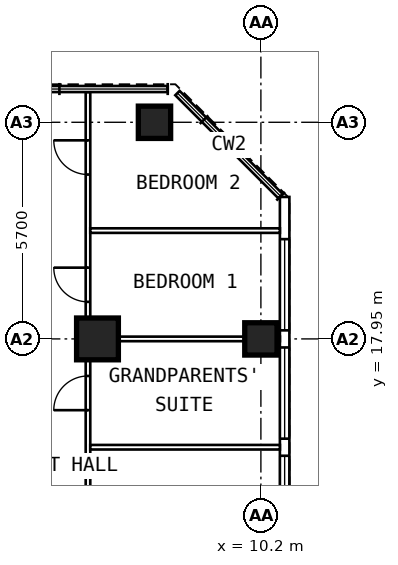
"""IFC4 building model, lengths in metres.
Left out: names, types, materials, properties, quantities, classifications, styles, units other than length and angle.
Written with IfcOpenShell. Run it as: python <this file> out.ifc"""

import sys

from ifc_helpers import new_model, si_unit, direction, frame, frame_2d, origin, origin_2d, place, context, subcontext, project, spatial, rectangle, extrude, element, fill, save


model = new_model("IFC4")
c1 = context("Model", 3, precision=1e-05, world=origin(), true_north=direction((0.0, 1.0)))
c2 = subcontext(c1, "Body", "Model", "MODEL_VIEW")
j1 = project(units=[si_unit("LENGTHUNIT", "METRE"), si_unit("PLANEANGLEUNIT", "RADIAN")], contexts=[c1])
p1 = place(None, origin())
s1 = spatial("IfcSite", under=j1, at=p1, CompositionType="ELEMENT")
p2 = place(p1, origin())
s2 = spatial("IfcBuilding", under=s1, at=p2, CompositionType="ELEMENT")
p3 = place(p2, frame((0.0, 0.0, 256.8)))
s3 = spatial("IfcBuildingStorey", under=s2, at=p3, CompositionType="ELEMENT", Elevation=256.8)
for number, where, z_axis, x_axis in (
    (1, (10.2, 17.95, 0.0), (0.0, 0.0, 1.0), (0.0, 1.0, 0.0)),
    (2, (7.4, 23.65, 0.0), (0.0, 0.0, 1.0), (0.0, 1.0, 0.0)),
):
    element("IfcColumn", number, at=place(p3, frame(where, z_axis=z_axis, x_axis=x_axis)), inside=s3, PredefinedType="COLUMN", context=c2, shape_type="SweptSolid", body=[
        extrude(rectangle(XDim=0.85, YDim=0.85, at=origin_2d()), origin(), (0.0, 0.0, 1.0), 3.6),
    ])
p4 = place(p3, frame((5.9, 17.95, 0.0), z_axis=(0.0, 0.0, 1.0), x_axis=(0.0, 1.0, 0.0)))
e3 = element("IfcColumn", 3, at=p4, inside=s3, PredefinedType="COLUMN", context=c2, shape_type="SweptSolid", body=[
    extrude(rectangle(XDim=1.1, YDim=1.1, at=origin_2d()), origin(), (0.0, 0.0, 1.0), 3.6),
])
p5 = place(p3, frame((10.825, 6.409, 0.0), z_axis=(0.0, 0.0, 1.0), x_axis=(0.0, 1.0, 0.0)))
e4 = element("IfcWall", 4, at=p5, inside=s3, PredefinedType="SOLIDWALL", context=c2, shape_type="SweptSolid", body=[
    extrude(rectangle(XDim=15.276, YDim=0.25, at=frame_2d((7.638, 0.0))), origin(), (0.0, 0.0, 1.0), 3.3),
])
p6 = place(p5, frame((0.366, 0.0, 0.8)))
e5 = element("IfcOpeningElement", 5, at=p6, cuts=e4, PredefinedType="OPENING", context=c2, shape_type="SweptSolid", body=[
    extrude(rectangle(XDim=2.4, YDim=1.8, at=frame_2d((1.2, 0.9))), frame((0.0, 0.137, 0.0), z_axis=(0.0, -1.0, 0.0), x_axis=(1.0, 0.0, 0.0)), (0.0, 0.0, 1.0), 0.274),
])
p7 = place(p5, frame((3.216, 0.0, 0.8)))
e6 = element("IfcOpeningElement", 6, at=p7, cuts=e4, PredefinedType="OPENING", context=c2, shape_type="SweptSolid", body=[
    extrude(rectangle(XDim=2.4, YDim=1.8, at=frame_2d((1.2, 0.9))), frame((0.0, 0.137, 0.0), z_axis=(0.0, -1.0, 0.0), x_axis=(1.0, 0.0, 0.0)), (0.0, 0.0, 1.0), 0.274),
])
p8 = place(p5, frame((6.066, 0.0, 0.8)))
e7 = element("IfcOpeningElement", 7, at=p8, cuts=e4, PredefinedType="OPENING", context=c2, shape_type="SweptSolid", body=[
    extrude(rectangle(XDim=2.4, YDim=1.8, at=frame_2d((1.2, 0.9))), frame((0.0, 0.137, 0.0), z_axis=(0.0, -1.0, 0.0), x_axis=(1.0, 0.0, 0.0)), (0.0, 0.0, 1.0), 0.274),
])
p9 = place(p5, frame((8.916, 0.0, 0.8)))
e8 = element("IfcOpeningElement", 8, at=p9, cuts=e4, PredefinedType="OPENING", context=c2, shape_type="SweptSolid", body=[
    extrude(rectangle(XDim=2.4, YDim=1.8, at=frame_2d((1.2, 0.9))), frame((0.0, 0.137, 0.0), z_axis=(0.0, -1.0, 0.0), x_axis=(1.0, 0.0, 0.0)), (0.0, 0.0, 1.0), 0.274),
])
p10 = place(p5, frame((11.766, 0.0, 0.8)))
e9 = element("IfcOpeningElement", 9, at=p10, cuts=e4, PredefinedType="OPENING", context=c2, shape_type="SweptSolid", body=[
    extrude(rectangle(XDim=2.4, YDim=1.8, at=frame_2d((1.2, 0.9))), frame((0.0, 0.137, 0.0), z_axis=(0.0, -1.0, 0.0), x_axis=(1.0, 0.0, 0.0)), (0.0, 0.0, 1.0), 0.274),
])
p11 = place(p3, frame((5.65, 9.6, 0.0), z_axis=(0.0, 0.0, 1.0), x_axis=(0.0, 1.0, 0.0)))
e10 = element("IfcWall", 10, at=p11, inside=s3, PredefinedType="PARTITIONING", context=c2, shape_type="SweptSolid", body=[
    extrude(rectangle(XDim=14.845, YDim=0.12, at=frame_2d((7.422, 0.0))), origin(), (0.0, 0.0, 1.0), 3.3),
])
p12 = place(p11, frame((3.35, 0.0, 0.0)))
e11 = element("IfcOpeningElement", 11, at=p12, cuts=e10, PredefinedType="OPENING", context=c2, shape_type="SweptSolid", body=[
    extrude(rectangle(XDim=0.9, YDim=2.1, at=frame_2d((0.45, 1.05))), frame((0.0, 0.072, 0.0), z_axis=(0.0, -1.0, 0.0), x_axis=(1.0, 0.0, 0.0)), (0.0, 0.0, 1.0), 0.144),
])
p13 = place(p11, frame((6.475, 0.0, 0.0)))
e12 = element("IfcOpeningElement", 12, at=p13, cuts=e10, PredefinedType="OPENING", context=c2, shape_type="SweptSolid", body=[
    extrude(rectangle(XDim=0.9, YDim=2.1, at=frame_2d((0.45, 1.05))), frame((0.0, 0.072, 0.0), z_axis=(0.0, -1.0, 0.0), x_axis=(1.0, 0.0, 0.0)), (0.0, 0.0, 1.0), 0.144),
])
p14 = place(p11, frame((9.325, 0.0, 0.0)))
e13 = element("IfcOpeningElement", 13, at=p14, cuts=e10, PredefinedType="OPENING", context=c2, shape_type="SweptSolid", body=[
    extrude(rectangle(XDim=0.9, YDim=2.1, at=frame_2d((0.45, 1.05))), frame((0.0, 0.072, 0.0), z_axis=(0.0, -1.0, 0.0), x_axis=(1.0, 0.0, 0.0)), (0.0, 0.0, 1.0), 0.144),
])
p15 = place(p11, frame((12.675, 0.0, 0.0)))
e14 = element("IfcOpeningElement", 14, at=p15, cuts=e10, PredefinedType="OPENING", context=c2, shape_type="SweptSolid", body=[
    extrude(rectangle(XDim=0.9, YDim=2.1, at=frame_2d((0.45, 1.05))), frame((0.0, 0.072, 0.0), z_axis=(0.0, -1.0, 0.0), x_axis=(1.0, 0.0, 0.0)), (0.0, 0.0, 1.0), 0.144),
])
for number, where, z_axis, x_axis in (
    (15, (5.71, 15.1, 0.0), (0.0, 0.0, 1.0), (1.0, 0.0, 0.0)),
    (16, (5.71, 17.95, 0.0), (0.0, 0.0, 1.0), (1.0, 0.0, 0.0)),
    (17, (5.71, 20.8, 0.0), (0.0, 0.0, 1.0), (1.0, 0.0, 0.0)),
):
    element("IfcWall", number, at=place(p3, frame(where, z_axis=z_axis, x_axis=x_axis)), inside=s3, PredefinedType="PARTITIONING", context=c2, shape_type="SweptSolid", body=[
        extrude(rectangle(XDim=4.99, YDim=0.12, at=frame_2d((2.495, 0.0))), origin(), (0.0, 0.0, 1.0), 3.3),
    ])
p16 = place(p8, origin())
e18 = element("IfcWindow", 18, at=p16, inside=s3, PartitioningType="SINGLE_PANEL", PredefinedType="WINDOW", context=c2, shape_type="SweptSolid", body=[
    extrude(rectangle(XDim=2.4, YDim=1.8, at=frame_2d((1.2, 0.9))), frame((0.0, 0.03, 0.0), z_axis=(0.0, -1.0, 0.0), x_axis=(1.0, 0.0, 0.0)), (0.0, 0.0, 1.0), 0.06),
])
fill(e7, e18)
p17 = place(p9, origin())
e19 = element("IfcWindow", 19, at=p17, inside=s3, PartitioningType="SINGLE_PANEL", PredefinedType="WINDOW", context=c2, shape_type="SweptSolid", body=[
    extrude(rectangle(XDim=2.4, YDim=1.8, at=frame_2d((1.2, 0.9))), frame((0.0, 0.03, 0.0), z_axis=(0.0, -1.0, 0.0), x_axis=(1.0, 0.0, 0.0)), (0.0, 0.0, 1.0), 0.06),
])
fill(e8, e19)
p18 = place(p10, origin())
e20 = element("IfcWindow", 20, at=p18, inside=s3, PartitioningType="SINGLE_PANEL", PredefinedType="WINDOW", context=c2, shape_type="SweptSolid", body=[
    extrude(rectangle(XDim=2.4, YDim=1.8, at=frame_2d((1.2, 0.9))), frame((0.0, 0.03, 0.0), z_axis=(0.0, -1.0, 0.0), x_axis=(1.0, 0.0, 0.0)), (0.0, 0.0, 1.0), 0.06),
])
fill(e9, e20)
p19 = place(p13, origin())
e21 = element("IfcDoor", 21, at=p19, inside=s3, OperationType="SINGLE_SWING_LEFT", PredefinedType="DOOR", context=c2, shape_type="SweptSolid", body=[
    extrude(rectangle(XDim=0.9, YDim=2.1, at=frame_2d((0.45, 1.05))), frame((0.0, 0.025, 0.0), z_axis=(0.0, -1.0, 0.0), x_axis=(1.0, 0.0, 0.0)), (0.0, 0.0, 1.0), 0.05),
])
fill(e12, e21)
p20 = place(p14, origin())
e22 = element("IfcDoor", 22, at=p20, inside=s3, OperationType="SINGLE_SWING_RIGHT", PredefinedType="DOOR", context=c2, shape_type="SweptSolid", body=[
    extrude(rectangle(XDim=0.9, YDim=2.1, at=frame_2d((0.45, 1.05))), frame((0.0, 0.025, 0.0), z_axis=(0.0, -1.0, 0.0), x_axis=(1.0, 0.0, 0.0)), (0.0, 0.0, 1.0), 0.05),
])
fill(e13, e22)
p21 = place(p15, origin())
e23 = element("IfcDoor", 23, at=p21, inside=s3, OperationType="SINGLE_SWING_RIGHT", PredefinedType="DOOR", context=c2, shape_type="SweptSolid", body=[
    extrude(rectangle(XDim=0.9, YDim=2.1, at=frame_2d((0.45, 1.05))), frame((0.0, 0.025, 0.0), z_axis=(0.0, -1.0, 0.0), x_axis=(1.0, 0.0, 0.0)), (0.0, 0.0, 1.0), 0.05),
])
fill(e14, e23)
save(model, sys.argv[1])
